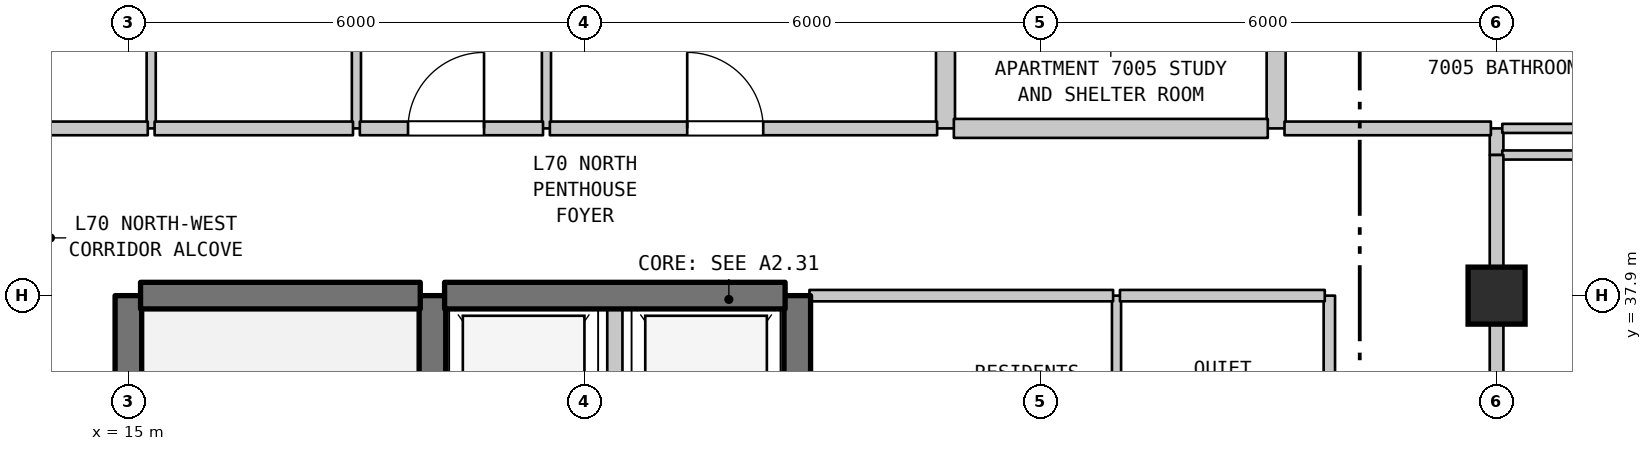
"""IFC4 building model, lengths in metres.
Left out: names, types, materials, properties, quantities, classifications, styles, units other than length and angle.
Written with IfcOpenShell. Run it as: python <this file> out.ifc"""

import sys

from ifc_helpers import new_model, si_unit, direction, frame, frame_2d, origin, origin_2d, place, context, subcontext, project, spatial, rectangle, extrude, element, fill, save


model = new_model("IFC4")
c1 = context("Model", 3, precision=1e-05, world=origin(), true_north=direction((0.0, 1.0)))
c2 = subcontext(c1, "Body", "Model", "MODEL_VIEW")
j1 = project(units=[si_unit("LENGTHUNIT", "METRE"), si_unit("PLANEANGLEUNIT", "RADIAN")], contexts=[c1])
p1 = place(None, origin())
s1 = spatial("IfcSite", under=j1, at=p1, CompositionType="ELEMENT")
p2 = place(p1, origin())
s2 = spatial("IfcBuilding", under=s1, at=p2, CompositionType="ELEMENT")
p3 = place(p2, frame((0.0, 0.0, 280.6)))
s3 = spatial("IfcBuildingStorey", under=s2, at=p3, CompositionType="ELEMENT", Elevation=280.6)
p4 = place(p3, frame((33.0, 37.9, 0.0), z_axis=(0.0, 0.0, 1.0), x_axis=(1.0, 0.0, 0.0)))
e1 = element("IfcColumn", 1, at=p4, inside=s3, PredefinedType="COLUMN", context=c2, shape_type="SweptSolid", body=[
    extrude(rectangle(XDim=0.75, YDim=0.75, at=origin_2d()), origin(), (0.0, 0.0, 1.0), 3.7),
])
p5 = place(p3, frame((15.0, 31.1, 0.0), z_axis=(0.0, 0.0, 1.0), x_axis=(0.0, 1.0, 0.0)))
e2 = element("IfcWall", 2, at=p5, inside=s3, PredefinedType="SHEAR", context=c2, shape_type="SweptSolid", body=[
    extrude(rectangle(XDim=6.8, YDim=0.35, at=frame_2d((3.4, 0.0))), origin(), (0.0, 0.0, 1.0), 3.39),
])
p6 = place(p3, frame((15.3, 40.1, 0.0), z_axis=(0.0, 0.0, 1.0), x_axis=(0.0, 1.0, 0.0)))
e3 = element("IfcWall", 3, at=p6, inside=s3, PredefinedType="PARTITIONING", context=c2, shape_type="SweptSolid", body=[
    extrude(rectangle(XDim=3.2, YDim=0.12, at=frame_2d((1.6, 0.0))), origin(), (0.0, 0.0, 1.0), 3.39),
])
p7 = place(p3, frame((18.0, 40.1, 0.0), z_axis=(0.0, 0.0, 1.0), x_axis=(0.0, 1.0, 0.0)))
e4 = element("IfcWall", 4, at=p7, inside=s3, PredefinedType="PARTITIONING", context=c2, shape_type="SweptSolid", body=[
    extrude(rectangle(XDim=3.2, YDim=0.12, at=frame_2d((1.6, 0.0))), origin(), (0.0, 0.0, 1.0), 3.39),
])
p8 = place(p7, frame((1.15, 0.0, 0.0)))
e5 = element("IfcOpeningElement", 5, at=p8, cuts=e4, PredefinedType="OPENING", context=c2, shape_type="SweptSolid", body=[
    extrude(rectangle(XDim=0.9, YDim=2.15, at=frame_2d((0.45, 1.075))), frame((0.0, 0.07, 0.0), z_axis=(0.0, -1.0, 0.0), x_axis=(1.0, 0.0, 0.0)), (0.0, 0.0, 1.0), 0.14),
])
p9 = place(p3, frame((19.0, 35.0, 0.0), z_axis=(0.0, 0.0, 1.0), x_axis=(0.0, 1.0, 0.0)))
e6 = element("IfcWall", 6, at=p9, inside=s3, PredefinedType="SHEAR", context=c2, shape_type="SweptSolid", body=[
    extrude(rectangle(XDim=2.9, YDim=0.35, at=frame_2d((1.45, 0.0))), origin(), (0.0, 0.0, 1.0), 3.39),
])
p10 = place(p3, frame((20.5, 40.1, 0.0), z_axis=(0.0, 0.0, 1.0), x_axis=(0.0, 1.0, 0.0)))
e7 = element("IfcWall", 7, at=p10, inside=s3, PredefinedType="PARTITIONING", context=c2, shape_type="SweptSolid", body=[
    extrude(rectangle(XDim=2.05, YDim=0.12, at=frame_2d((1.025, 0.0))), origin(), (0.0, 0.0, 1.0), 3.39),
])
p11 = place(p3, frame((21.4, 35.0, 0.0), z_axis=(0.0, 0.0, 1.0), x_axis=(0.0, 1.0, 0.0)))
e8 = element("IfcWall", 8, at=p11, inside=s3, PredefinedType="STANDARD", context=c2, shape_type="SweptSolid", body=[
    extrude(rectangle(XDim=2.9, YDim=0.2, at=frame_2d((1.45, 0.0))), origin(), (0.0, 0.0, 1.0), 3.39),
])
p12 = place(p3, frame((23.8, 35.0, 0.0), z_axis=(0.0, 0.0, 1.0), x_axis=(0.0, 1.0, 0.0)))
e9 = element("IfcWall", 9, at=p12, inside=s3, PredefinedType="SHEAR", context=c2, shape_type="SweptSolid", body=[
    extrude(rectangle(XDim=2.9, YDim=0.35, at=frame_2d((1.45, 0.0))), origin(), (0.0, 0.0, 1.0), 3.39),
])
p13 = place(p3, frame((25.75, 40.1, 0.0), z_axis=(0.0, 0.0, 1.0), x_axis=(0.0, 1.0, 0.0)))
e10 = element("IfcWall", 10, at=p13, inside=s3, PredefinedType="STANDARD", context=c2, shape_type="SweptSolid", body=[
    extrude(rectangle(XDim=2.3, YDim=0.25, at=frame_2d((1.15, 0.0))), origin(), (0.0, 0.0, 1.0), 3.39),
])
p14 = place(p3, frame((28.0, 35.0, 0.0), z_axis=(0.0, 0.0, 1.0), x_axis=(0.0, 1.0, 0.0)))
e11 = element("IfcWall", 11, at=p14, inside=s3, PredefinedType="PARTITIONING", context=c2, shape_type="SweptSolid", body=[
    extrude(rectangle(XDim=2.9, YDim=0.12, at=frame_2d((1.45, 0.0))), origin(), (0.0, 0.0, 1.0), 3.39),
])
p15 = place(p3, frame((30.1, 40.1, 0.0), z_axis=(0.0, 0.0, 1.0), x_axis=(0.0, 1.0, 0.0)))
e12 = element("IfcWall", 12, at=p15, inside=s3, PredefinedType="STANDARD", context=c2, shape_type="SweptSolid", body=[
    extrude(rectangle(XDim=2.3, YDim=0.25, at=frame_2d((1.15, 0.0))), origin(), (0.0, 0.0, 1.0), 3.39),
])
p16 = place(p3, frame((30.8, 35.0, 0.0), z_axis=(0.0, 0.0, 1.0), x_axis=(0.0, 1.0, 0.0)))
e13 = element("IfcWall", 13, at=p16, inside=s3, PredefinedType="STANDARD", context=c2, shape_type="SweptSolid", body=[
    extrude(rectangle(XDim=2.9, YDim=0.15, at=frame_2d((1.45, 0.0))), origin(), (0.0, 0.0, 1.0), 3.39),
])
p17 = place(p3, frame((33.0, 36.639, 0.0), z_axis=(0.0, 0.0, 1.0), x_axis=(0.0, 1.0, 0.0)))
e14 = element("IfcWall", 14, at=p17, inside=s3, PredefinedType="STANDARD", context=c2, shape_type="SweptSolid", body=[
    extrude(rectangle(XDim=1.261, YDim=0.18, at=frame_2d((0.63, 0.0))), origin(), (0.0, 0.0, 1.0), 2.89),
])
p18 = place(p3, frame((33.0, 39.75, 0.0), z_axis=(0.0, 0.0, 1.0), x_axis=(0.0, 1.0, 0.0)))
e15 = element("IfcWall", 15, at=p18, inside=s3, PredefinedType="STANDARD", context=c2, shape_type="SweptSolid", body=[
    extrude(rectangle(XDim=0.35, YDim=0.18, at=frame_2d((0.175, 0.0))), origin(), (0.0, 0.0, 1.0), 3.39),
])
p19 = place(p3, frame((15.16, 37.9, 0.0), z_axis=(0.0, 0.0, 1.0), x_axis=(1.0, 0.0, 0.0)))
e16 = element("IfcWall", 16, at=p19, inside=s3, PredefinedType="SHEAR", context=c2, shape_type="SweptSolid", body=[
    extrude(rectangle(XDim=3.68, YDim=0.35, at=frame_2d((1.84, 0.0))), origin(), (0.0, 0.0, 1.0), 3.39),
])
p20 = place(p3, frame((19.16, 37.9, 0.0), z_axis=(0.0, 0.0, 1.0), x_axis=(1.0, 0.0, 0.0)))
e17 = element("IfcWall", 17, at=p20, inside=s3, PredefinedType="SHEAR", context=c2, shape_type="SweptSolid", body=[
    extrude(rectangle(XDim=4.48, YDim=0.35, at=frame_2d((2.24, 0.0))), origin(), (0.0, 0.0, 1.0), 3.39),
])
p21 = place(p3, frame((23.96, 37.9, 0.0), z_axis=(0.0, 0.0, 1.0), x_axis=(1.0, 0.0, 0.0)))
e18 = element("IfcWall", 18, at=p21, inside=s3, PredefinedType="STANDARD", context=c2, shape_type="SweptSolid", body=[
    extrude(rectangle(XDim=3.995, YDim=0.15, at=frame_2d((1.998, 0.0))), origin(), (0.0, 0.0, 1.0), 2.89),
])
p22 = place(p3, frame((28.045, 37.9, 0.0), z_axis=(0.0, 0.0, 1.0), x_axis=(1.0, 0.0, 0.0)))
e19 = element("IfcWall", 19, at=p22, inside=s3, PredefinedType="STANDARD", context=c2, shape_type="SweptSolid", body=[
    extrude(rectangle(XDim=2.695, YDim=0.15, at=frame_2d((1.348, 0.0))), origin(), (0.0, 0.0, 1.0), 2.89),
])
p23 = place(p3, frame((33.075, 39.75, 0.0), z_axis=(0.0, 0.0, 1.0), x_axis=(1.0, 0.0, 0.0)))
e20 = element("IfcWall", 20, at=p23, inside=s3, PredefinedType="PARTITIONING", context=c2, shape_type="SweptSolid", body=[
    extrude(rectangle(XDim=4.46, YDim=0.12, at=frame_2d((2.23, 0.0))), origin(), (0.0, 0.0, 1.0), 3.39),
])
p24 = place(p3, frame((12.975, 40.1, 0.0), z_axis=(0.0, 0.0, 1.0), x_axis=(1.0, 0.0, 0.0)))
e21 = element("IfcWall", 21, at=p24, inside=s3, PredefinedType="STANDARD", context=c2, shape_type="SweptSolid", body=[
    extrude(rectangle(XDim=2.28, YDim=0.18, at=frame_2d((1.14, 0.0))), origin(), (0.0, 0.0, 1.0), 3.39),
])
p25 = place(p3, frame((15.345, 40.1, 0.0), z_axis=(0.0, 0.0, 1.0), x_axis=(1.0, 0.0, 0.0)))
e22 = element("IfcWall", 22, at=p25, inside=s3, PredefinedType="STANDARD", context=c2, shape_type="SweptSolid", body=[
    extrude(rectangle(XDim=2.61, YDim=0.18, at=frame_2d((1.305, 0.0))), origin(), (0.0, 0.0, 1.0), 3.39),
])
p26 = place(p3, frame((18.045, 40.1, 0.0), z_axis=(0.0, 0.0, 1.0), x_axis=(1.0, 0.0, 0.0)))
e23 = element("IfcWall", 23, at=p26, inside=s3, PredefinedType="STANDARD", context=c2, shape_type="SweptSolid", body=[
    extrude(rectangle(XDim=2.41, YDim=0.18, at=frame_2d((1.205, 0.0))), origin(), (0.0, 0.0, 1.0), 3.39),
])
p27 = place(p26, frame((0.634, 0.0, 0.0)))
e24 = element("IfcOpeningElement", 24, at=p27, cuts=e23, PredefinedType="OPENING", context=c2, shape_type="SweptSolid", body=[
    extrude(rectangle(XDim=1.0, YDim=2.15, at=frame_2d((0.5, 1.075))), frame((0.0, 0.1, 0.0), z_axis=(0.0, -1.0, 0.0), x_axis=(1.0, 0.0, 0.0)), (0.0, 0.0, 1.0), 0.2),
])
p28 = place(p3, frame((20.545, 40.1, 0.0), z_axis=(0.0, 0.0, 1.0), x_axis=(1.0, 0.0, 0.0)))
e25 = element("IfcWall", 25, at=p28, inside=s3, PredefinedType="STANDARD", context=c2, shape_type="SweptSolid", body=[
    extrude(rectangle(XDim=5.095, YDim=0.18, at=frame_2d((2.547, 0.0))), origin(), (0.0, 0.0, 1.0), 3.39),
])
p29 = place(p28, frame((1.807, 0.0, 0.0)))
e26 = element("IfcOpeningElement", 26, at=p29, cuts=e25, PredefinedType="OPENING", context=c2, shape_type="SweptSolid", body=[
    extrude(rectangle(XDim=1.0, YDim=2.15, at=frame_2d((0.5, 1.075))), frame((0.0, 0.1, 0.0), z_axis=(0.0, -1.0, 0.0), x_axis=(1.0, 0.0, 0.0)), (0.0, 0.0, 1.0), 0.2),
])
p30 = place(p3, frame((25.86, 40.1, 0.0), z_axis=(0.0, 0.0, 1.0), x_axis=(1.0, 0.0, 0.0)))
e27 = element("IfcWall", 27, at=p30, inside=s3, PredefinedType="STANDARD", context=c2, shape_type="SweptSolid", body=[
    extrude(rectangle(XDim=4.13, YDim=0.25, at=frame_2d((2.065, 0.0))), origin(), (0.0, 0.0, 1.0), 3.39),
])
p31 = place(p3, frame((30.21, 40.1, 0.0), z_axis=(0.0, 0.0, 1.0), x_axis=(1.0, 0.0, 0.0)))
e28 = element("IfcWall", 28, at=p31, inside=s3, PredefinedType="STANDARD", context=c2, shape_type="SweptSolid", body=[
    extrude(rectangle(XDim=2.715, YDim=0.18, at=frame_2d((1.357, 0.0))), origin(), (0.0, 0.0, 1.0), 3.39),
])
p32 = place(p3, frame((33.075, 40.1, 0.0), z_axis=(0.0, 0.0, 1.0), x_axis=(1.0, 0.0, 0.0)))
e29 = element("IfcWall", 29, at=p32, inside=s3, PredefinedType="PARTITIONING", context=c2, shape_type="SweptSolid", body=[
    extrude(rectangle(XDim=1.18, YDim=0.12, at=frame_2d((0.59, 0.0))), origin(), (0.0, 0.0, 1.0), 3.39),
])
p33 = place(p3, frame((33.0, 37.9, 0.0), z_axis=(0.0, 0.0, 1.0), x_axis=(0.0, 1.0, 0.0)))
e30 = element("IfcWall", 30, at=p33, inside=s3, PredefinedType="STANDARD", context=c2, shape_type="SweptSolid", body=[
    extrude(rectangle(XDim=1.85, YDim=0.18, at=frame_2d((0.925, 0.0))), origin(), (0.0, 0.0, 1.0), 2.79),
])
p34 = place(p27, origin())
e31 = element("IfcDoor", 31, at=p34, inside=s3, OperationType="SINGLE_SWING_RIGHT", PredefinedType="DOOR", context=c2, shape_type="SweptSolid", body=[
    extrude(rectangle(XDim=1.0, YDim=2.15, at=frame_2d((0.5, 1.075))), frame((0.0, 0.025, 0.0), z_axis=(0.0, -1.0, 0.0), x_axis=(1.0, 0.0, 0.0)), (0.0, 0.0, 1.0), 0.05),
])
fill(e24, e31)
p35 = place(p29, origin())
e32 = element("IfcDoor", 32, at=p35, inside=s3, OperationType="SINGLE_SWING_LEFT", PredefinedType="DOOR", context=c2, shape_type="SweptSolid", body=[
    extrude(rectangle(XDim=1.0, YDim=2.15, at=frame_2d((0.5, 1.075))), frame((0.0, 0.025, 0.0), z_axis=(0.0, -1.0, 0.0), x_axis=(1.0, 0.0, 0.0)), (0.0, 0.0, 1.0), 0.05),
])
fill(e26, e32)
save(model, sys.argv[1])
